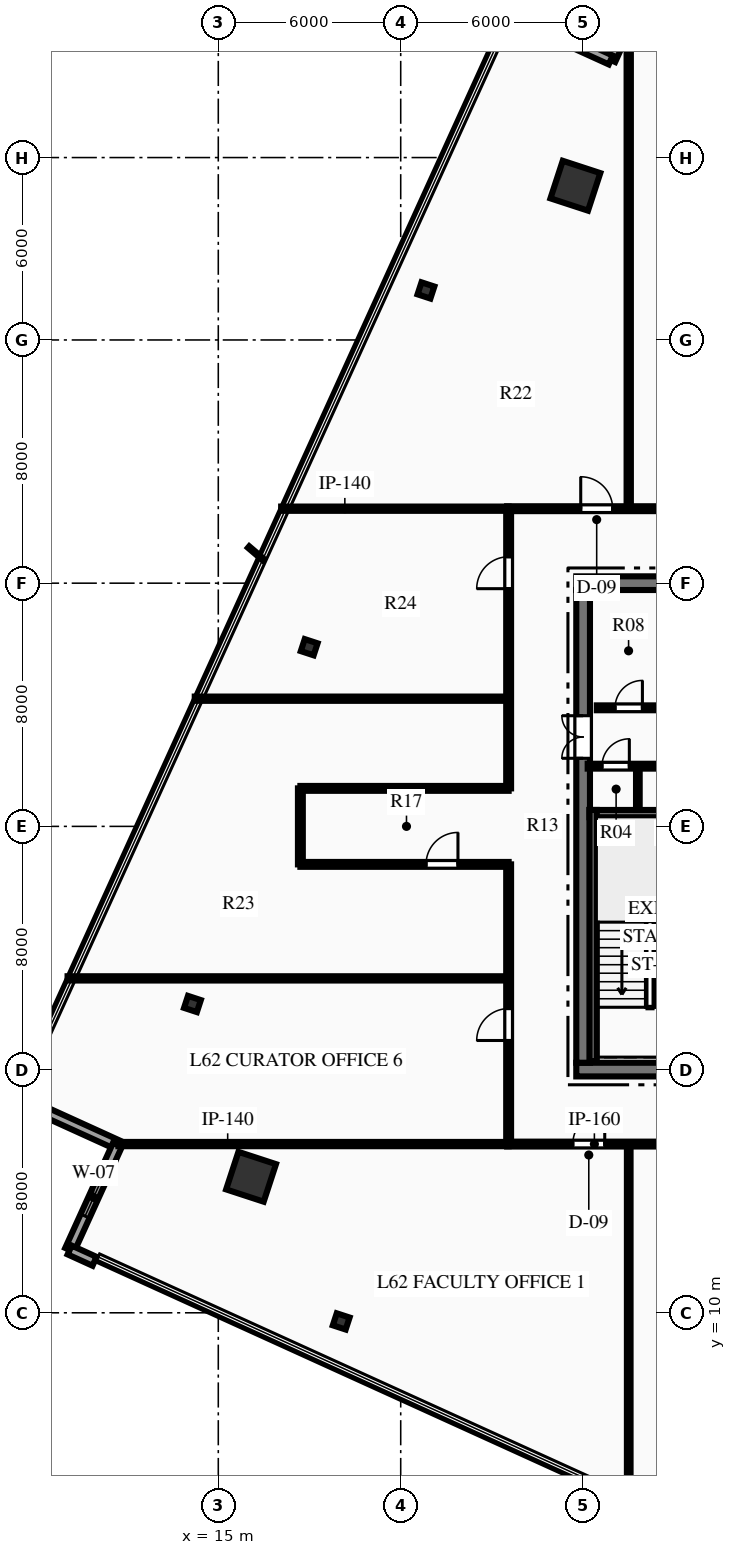
"""IFC4 building model, lengths in metres.
Left out: names, types, materials, properties, quantities, classifications, styles, units other than length and angle.
Written with IfcOpenShell. Run it as: python <this file> out.ifc"""

import sys

from ifc_helpers import new_model, si_unit, direction, frame, frame_2d, origin, origin_2d, place, context, subcontext, project, spatial, rectangle, hollow_rectangle, i_section, extrude, element, fill, save


model = new_model("IFC4")
c1 = context("Model", 3, precision=1e-05, world=origin(), true_north=direction((0.0, 1.0)))
c2 = subcontext(c1, "Body", "Model", "MODEL_VIEW")
j1 = project(units=[si_unit("LENGTHUNIT", "METRE"), si_unit("PLANEANGLEUNIT", "RADIAN")], contexts=[c1])
p1 = place(None, origin())
s1 = spatial("IfcSite", under=j1, at=p1, CompositionType="ELEMENT")
p2 = place(p1, origin())
s2 = spatial("IfcBuilding", under=s1, at=p2, CompositionType="ELEMENT")
p3 = place(p2, frame((0.0, 0.0, 248.7)))
s3 = spatial("IfcBuildingStorey", under=s2, at=p3, CompositionType="ELEMENT", Elevation=248.7)
p4 = place(p3, frame((26.775, 18.0, 0.0), z_axis=(0.0, 0.0, 1.0), x_axis=(1.0, 0.0, 0.0)))
e1 = element("IfcWall", 1, at=p4, inside=s3, PredefinedType="SHEAR", context=c2, shape_type="SweptSolid", body=[
    extrude(rectangle(XDim=18.45, YDim=0.45, at=frame_2d((9.225, 0.0))), origin(), (0.0, 0.0, 1.0), 3.75),
])
p5 = place(p4, frame((7.325, 0.0, 0.0)))
e2 = element("IfcOpeningElement", 2, at=p5, cuts=e1, PredefinedType="OPENING", context=c2, shape_type="SweptSolid", body=[
    extrude(rectangle(XDim=1.1, YDim=2.15, at=frame_2d((0.55, 1.075))), frame((0.0, 0.235, 0.0), z_axis=(0.0, -1.0, 0.0), x_axis=(1.0, 0.0, 0.0)), (0.0, 0.0, 1.0), 0.47),
])
p6 = place(p4, frame((10.025, 0.0, 0.0)))
e3 = element("IfcOpeningElement", 3, at=p6, cuts=e1, PredefinedType="OPENING", context=c2, shape_type="SweptSolid", body=[
    extrude(rectangle(XDim=1.1, YDim=2.15, at=frame_2d((0.55, 1.075))), frame((0.0, 0.235, 0.0), z_axis=(0.0, -1.0, 0.0), x_axis=(1.0, 0.0, 0.0)), (0.0, 0.0, 1.0), 0.47),
])
p7 = place(p3, frame((26.775, 34.0, 0.0), z_axis=(0.0, 0.0, 1.0), x_axis=(1.0, 0.0, 0.0)))
e4 = element("IfcWall", 4, at=p7, inside=s3, PredefinedType="SHEAR", context=c2, shape_type="SweptSolid", body=[
    extrude(rectangle(XDim=18.45, YDim=0.45, at=frame_2d((9.225, 0.0))), origin(), (0.0, 0.0, 1.0), 3.75),
])
p8 = place(p3, frame((27.0, 18.225, 0.0), z_axis=(0.0, 0.0, 1.0), x_axis=(0.0, 1.0, 0.0)))
e5 = element("IfcWall", 5, at=p8, inside=s3, PredefinedType="SHEAR", context=c2, shape_type="SweptSolid", body=[
    extrude(rectangle(XDim=15.55, YDim=0.45, at=frame_2d((7.775, 0.0))), origin(), (0.0, 0.0, 1.0), 3.75),
])
p9 = place(p8, frame((10.015, 0.0, 0.0)))
e6 = element("IfcOpeningElement", 6, at=p9, cuts=e5, PredefinedType="OPENING", context=c2, shape_type="SweptSolid", body=[
    extrude(rectangle(XDim=1.4, YDim=2.2, at=frame_2d((0.7, 1.1))), frame((0.0, 0.235, 0.0), z_axis=(0.0, -1.0, 0.0), x_axis=(1.0, 0.0, 0.0)), (0.0, 0.0, 1.0), 0.47),
])
p10 = place(p3, frame((27.21, 26.42, 0.0), z_axis=(0.0, 0.0, 1.0), x_axis=(1.0, 0.0, 0.0)))
e7 = element("IfcWall", 7, at=p10, inside=s3, PredefinedType="SHEAR", context=c2, shape_type="SweptSolid", body=[
    extrude(rectangle(XDim=3.98, YDim=0.24, at=frame_2d((1.99, 0.0))), origin(), (0.0, 0.0, 1.0), 3.75),
])
p11 = place(p3, frame((27.33, 18.28, 0.0), z_axis=(0.0, 0.0, 1.0), x_axis=(0.0, 1.0, 0.0)))
e8 = element("IfcWall", 8, at=p11, inside=s3, PredefinedType="SHEAR", context=c2, shape_type="SweptSolid", body=[
    extrude(rectangle(XDim=8.26, YDim=0.24, at=frame_2d((4.13, 0.0))), origin(), (0.0, 0.0, 1.0), 3.75),
])
for number, where, z_axis, x_axis in (
    (9, (26.745, 47.073, 0.0), (0.0, 0.0, 1.0), (0.311, 0.95, 0.0)),
    (10, (16.077, 14.475, 0.0), (0.0, 0.0, 1.0), (0.311, 0.95, 0.0)),
):
    element("IfcColumn", number, at=place(p3, frame(where, z_axis=z_axis, x_axis=x_axis)), inside=s3, PredefinedType="COLUMN", context=c2, shape_type="SweptSolid", body=[
        extrude(hollow_rectangle(XDim=1.3, YDim=1.3, WallThickness=0.06, at=origin_2d()), origin(), (0.0, 0.0, 1.0), 3.75),
    ])
for number, where, z_axis, x_axis in (
    (11, (21.83, 43.629, 0.0), (0.0, 0.0, 1.0), (0.311, 0.95, 0.0)),
    (12, (17.99, 31.894, 0.0), (0.0, 0.0, 1.0), (0.311, 0.95, 0.0)),
    (13, (14.149, 20.158, 0.0), (0.0, 0.0, 1.0), (0.311, 0.95, 0.0)),
    (14, (19.043, 9.716, 0.0), (0.0, 0.0, 1.0), (0.311, 0.95, 0.0)),
):
    element("IfcColumn", number, at=place(p3, frame(where, z_axis=z_axis, x_axis=x_axis)), inside=s3, PredefinedType="COLUMN", context=c2, shape_type="SweptSolid", body=[
        extrude(i_section(OverallWidth=0.416, OverallDepth=0.445, WebThickness=0.039, FlangeThickness=0.063, at=origin_2d()), origin(), (0.0, 0.0, 1.0), 3.75),
    ])
p12 = place(p3, frame((27.909, 51.21, 0.0), z_axis=(0.0, 0.0, 1.0), x_axis=(0.413885232781, 0.910329069121, 0.0)))
e15 = element("IfcWall", 15, at=p12, inside=s3, PredefinedType="STANDARD", context=c2, shape_type="SweptSolid", body=[
    extrude(rectangle(XDim=3.8, YDim=0.32, at=frame_2d((1.9, 0.0))), origin(), (0.0, 0.0, 1.0), 3.48),
])
p13 = place(p3, frame((24.449, 52.782, 0.0), z_axis=(0.0, 0.0, 1.0), x_axis=(0.910329069121, -0.413885232781, 0.0)))
e16 = element("IfcWall", 16, at=p13, inside=s3, PredefinedType="STANDARD", context=c2, shape_type="SweptSolid", body=[
    extrude(rectangle(XDim=3.8, YDim=0.32, at=frame_2d((1.9, 0.0))), origin(), (0.0, 0.0, 1.0), 3.48),
])
p14 = place(p13, frame((1.225, 0.0, 0.85)))
e17 = element("IfcOpeningElement", 17, at=p14, cuts=e16, PredefinedType="OPENING", context=c2, shape_type="SweptSolid", body=[
    extrude(rectangle(XDim=1.35, YDim=1.95, at=frame_2d((0.675, 0.975))), frame((0.0, 0.17, 0.0), z_axis=(0.0, -1.0, 0.0), x_axis=(1.0, 0.0, 0.0)), (0.0, 0.0, 1.0), 0.34),
])
p15 = place(p3, frame((11.684, 15.525, 0.0), z_axis=(0.0, 0.0, 1.0), x_axis=(-0.910329069121, 0.413885232781, 0.0)))
e18 = element("IfcWall", 18, at=p15, inside=s3, PredefinedType="STANDARD", context=c2, shape_type="SweptSolid", body=[
    extrude(rectangle(XDim=3.8, YDim=0.32, at=frame_2d((1.9, 0.0))), origin(), (0.0, 0.0, 1.0), 3.48),
])
p16 = place(p3, frame((10.111, 12.066, 0.0), z_axis=(0.0, 0.0, 1.0), x_axis=(0.413885232781, 0.910329069121, 0.0)))
e19 = element("IfcWall", 19, at=p16, inside=s3, PredefinedType="STANDARD", context=c2, shape_type="SweptSolid", body=[
    extrude(rectangle(XDim=3.8, YDim=0.32, at=frame_2d((1.9, 0.0))), origin(), (0.0, 0.0, 1.0), 3.48),
])
p17 = place(p16, frame((1.225, 0.0, 0.85)))
e20 = element("IfcOpeningElement", 20, at=p17, cuts=e19, PredefinedType="OPENING", context=c2, shape_type="SweptSolid", body=[
    extrude(rectangle(XDim=1.35, YDim=1.95, at=frame_2d((0.675, 0.975))), frame((0.0, 0.17, 0.0), z_axis=(0.0, -1.0, 0.0), x_axis=(1.0, 0.0, 0.0)), (0.0, 0.0, 1.0), 0.34),
])
p18 = place(p3, frame((10.93, 11.693, 0.0), z_axis=(0.0, 0.0, 1.0), x_axis=(-0.910310733165, 0.413925559836, 0.0)))
e21 = element("IfcWall", 21, at=p18, inside=s3, PredefinedType="STANDARD", context=c2, shape_type="SweptSolid", body=[
    extrude(rectangle(XDim=0.9, YDim=0.32, at=frame_2d((0.45, 0.0))), origin(), (0.0, 0.0, 1.0), 3.48),
])
p19 = place(p3, frame((27.15, 27.98, 0.0), z_axis=(0.0, 0.0, 1.0), x_axis=(1.0, 0.0, 0.0)))
e22 = element("IfcWall", 22, at=p19, inside=s3, PredefinedType="PARTITIONING", context=c2, shape_type="SweptSolid", body=[
    extrude(rectangle(XDim=4.05, YDim=0.16, at=frame_2d((2.025, 0.0))), origin(), (0.0, 0.0, 1.0), 3.48),
])
p20 = place(p19, frame((0.47, 0.0, 0.0)))
e23 = element("IfcOpeningElement", 23, at=p20, cuts=e22, PredefinedType="OPENING", context=c2, shape_type="SweptSolid", body=[
    extrude(rectangle(XDim=0.9, YDim=2.15, at=frame_2d((0.45, 1.075))), frame((0.0, 0.09, 0.0), z_axis=(0.0, -1.0, 0.0), x_axis=(1.0, 0.0, 0.0)), (0.0, 0.0, 1.0), 0.18),
])
p21 = place(p19, frame((2.36, 0.0, 0.0)))
e24 = element("IfcOpeningElement", 24, at=p21, cuts=e22, PredefinedType="OPENING", context=c2, shape_type="SweptSolid", body=[
    extrude(rectangle(XDim=0.9, YDim=2.15, at=frame_2d((0.45, 1.075))), frame((0.0, 0.09, 0.0), z_axis=(0.0, -1.0, 0.0), x_axis=(1.0, 0.0, 0.0)), (0.0, 0.0, 1.0), 0.18),
])
p22 = place(p3, frame((28.8, 26.54, 0.0), z_axis=(0.0, 0.0, 1.0), x_axis=(0.0, 1.0, 0.0)))
e25 = element("IfcWall", 25, at=p22, inside=s3, PredefinedType="PARTITIONING", context=c2, shape_type="SweptSolid", body=[
    extrude(rectangle(XDim=1.44, YDim=0.12, at=frame_2d((0.72, 0.0))), origin(), (0.0, 0.0, 1.0), 3.48),
])
p23 = place(p3, frame((27.45, 29.9, 0.0), z_axis=(0.0, 0.0, 1.0), x_axis=(1.0, 0.0, 0.0)))
e26 = element("IfcWall", 26, at=p23, inside=s3, PredefinedType="PARTITIONING", context=c2, shape_type="SweptSolid", body=[
    extrude(rectangle(XDim=4.43, YDim=0.16, at=frame_2d((2.215, 0.0))), origin(), (0.0, 0.0, 1.0), 3.48),
])
p24 = place(p23, frame((0.6, 0.0, 0.0)))
e27 = element("IfcOpeningElement", 27, at=p24, cuts=e26, PredefinedType="OPENING", context=c2, shape_type="SweptSolid", body=[
    extrude(rectangle(XDim=0.9, YDim=2.15, at=frame_2d((0.45, 1.075))), frame((0.0, 0.09, 0.0), z_axis=(0.0, -1.0, 0.0), x_axis=(1.0, 0.0, 0.0)), (0.0, 0.0, 1.0), 0.18),
])
p25 = place(p23, frame((2.85, 0.0, 0.0)))
e28 = element("IfcOpeningElement", 28, at=p25, cuts=e26, PredefinedType="OPENING", context=c2, shape_type="SweptSolid", body=[
    extrude(rectangle(XDim=0.9, YDim=2.15, at=frame_2d((0.45, 1.075))), frame((0.0, 0.09, 0.0), z_axis=(0.0, -1.0, 0.0), x_axis=(1.0, 0.0, 0.0)), (0.0, 0.0, 1.0), 0.18),
])
p26 = place(p3, frame((24.5, 15.55, 0.0), z_axis=(0.0, 0.0, 1.0), x_axis=(1.0, 0.0, 0.0)))
e29 = element("IfcWall", 29, at=p26, inside=s3, PredefinedType="PARTITIONING", context=c2, shape_type="SweptSolid", body=[
    extrude(rectangle(XDim=10.25, YDim=0.16, at=frame_2d((5.125, 0.0))), origin(), (0.0, 0.0, 1.0), 3.48),
])
p27 = place(p26, frame((2.161, 0.0, 0.0)))
e30 = element("IfcOpeningElement", 30, at=p27, cuts=e29, PredefinedType="OPENING", context=c2, shape_type="SweptSolid", body=[
    extrude(rectangle(XDim=1.05, YDim=2.15, at=frame_2d((0.525, 1.075))), frame((0.0, 0.09, 0.0), z_axis=(0.0, -1.0, 0.0), x_axis=(1.0, 0.0, 0.0)), (0.0, 0.0, 1.0), 0.18),
])
p28 = place(p26, frame((7.619, 0.0, 0.0)))
e31 = element("IfcOpeningElement", 31, at=p28, cuts=e29, PredefinedType="OPENING", context=c2, shape_type="SweptSolid", body=[
    extrude(rectangle(XDim=1.05, YDim=2.15, at=frame_2d((0.525, 1.075))), frame((0.0, 0.09, 0.0), z_axis=(0.0, -1.0, 0.0), x_axis=(1.0, 0.0, 0.0)), (0.0, 0.0, 1.0), 0.18),
])
p29 = place(p3, frame((24.5, 36.45, 0.0), z_axis=(0.0, 0.0, 1.0), x_axis=(1.0, 0.0, 0.0)))
e32 = element("IfcWall", 32, at=p29, inside=s3, PredefinedType="PARTITIONING", context=c2, shape_type="SweptSolid", body=[
    extrude(rectangle(XDim=10.25, YDim=0.16, at=frame_2d((5.125, 0.0))), origin(), (0.0, 0.0, 1.0), 3.48),
])
p30 = place(p29, frame((2.421, 0.0, 0.0)))
e33 = element("IfcOpeningElement", 33, at=p30, cuts=e32, PredefinedType="OPENING", context=c2, shape_type="SweptSolid", body=[
    extrude(rectangle(XDim=1.05, YDim=2.15, at=frame_2d((0.525, 1.075))), frame((0.0, 0.09, 0.0), z_axis=(0.0, -1.0, 0.0), x_axis=(1.0, 0.0, 0.0)), (0.0, 0.0, 1.0), 0.18),
])
p31 = place(p29, frame((7.619, 0.0, 0.0)))
e34 = element("IfcOpeningElement", 34, at=p31, cuts=e32, PredefinedType="OPENING", context=c2, shape_type="SweptSolid", body=[
    extrude(rectangle(XDim=1.05, YDim=2.15, at=frame_2d((0.525, 1.075))), frame((0.0, 0.09, 0.0), z_axis=(0.0, -1.0, 0.0), x_axis=(1.0, 0.0, 0.0)), (0.0, 0.0, 1.0), 0.18),
])
p32 = place(p3, frame((24.55, 15.55, 0.0), z_axis=(0.0, 0.0, 1.0), x_axis=(0.0, 1.0, 0.0)))
e35 = element("IfcWall", 35, at=p32, inside=s3, PredefinedType="PARTITIONING", context=c2, shape_type="SweptSolid", body=[
    extrude(rectangle(XDim=9.2, YDim=0.16, at=frame_2d((4.6, 0.0))), origin(), (0.0, 0.0, 1.0), 3.48),
])
p33 = place(p32, frame((3.407, 0.0, 0.0)))
e36 = element("IfcOpeningElement", 36, at=p33, cuts=e35, PredefinedType="OPENING", context=c2, shape_type="SweptSolid", body=[
    extrude(rectangle(XDim=1.05, YDim=2.15, at=frame_2d((0.525, 1.075))), frame((0.0, 0.09, 0.0), z_axis=(0.0, -1.0, 0.0), x_axis=(1.0, 0.0, 0.0)), (0.0, 0.0, 1.0), 0.18),
])
p34 = place(p3, frame((24.55, 27.25, 0.0), z_axis=(0.0, 0.0, 1.0), x_axis=(0.0, 1.0, 0.0)))
e37 = element("IfcWall", 37, at=p34, inside=s3, PredefinedType="PARTITIONING", context=c2, shape_type="SweptSolid", body=[
    extrude(rectangle(XDim=9.2, YDim=0.16, at=frame_2d((4.6, 0.0))), origin(), (0.0, 0.0, 1.0), 3.48),
])
p35 = place(p34, frame((6.569, 0.0, 0.0)))
e38 = element("IfcOpeningElement", 38, at=p35, cuts=e37, PredefinedType="OPENING", context=c2, shape_type="SweptSolid", body=[
    extrude(rectangle(XDim=1.05, YDim=2.15, at=frame_2d((0.525, 1.075))), frame((0.0, 0.09, 0.0), z_axis=(0.0, -1.0, 0.0), x_axis=(1.0, 0.0, 0.0)), (0.0, 0.0, 1.0), 0.18),
])
p36 = place(p3, frame((17.7, 24.75, 0.0), z_axis=(0.0, 0.0, 1.0), x_axis=(1.0, 0.0, 0.0)))
e39 = element("IfcWall", 39, at=p36, inside=s3, PredefinedType="PARTITIONING", context=c2, shape_type="SweptSolid", body=[
    extrude(rectangle(XDim=6.85, YDim=0.16, at=frame_2d((3.425, 0.0))), origin(), (0.0, 0.0, 1.0), 3.48),
])
p37 = place(p36, frame((4.133, 0.0, 0.0)))
e40 = element("IfcOpeningElement", 40, at=p37, cuts=e39, PredefinedType="OPENING", context=c2, shape_type="SweptSolid", body=[
    extrude(rectangle(XDim=1.05, YDim=2.15, at=frame_2d((0.525, 1.075))), frame((0.0, 0.09, 0.0), z_axis=(0.0, -1.0, 0.0), x_axis=(1.0, 0.0, 0.0)), (0.0, 0.0, 1.0), 0.18),
])
p38 = place(p3, frame((17.7, 27.25, 0.0), z_axis=(0.0, 0.0, 1.0), x_axis=(1.0, 0.0, 0.0)))
e41 = element("IfcWall", 41, at=p38, inside=s3, PredefinedType="PARTITIONING", context=c2, shape_type="SweptSolid", body=[
    extrude(rectangle(XDim=6.85, YDim=0.16, at=frame_2d((3.425, 0.0))), origin(), (0.0, 0.0, 1.0), 3.48),
])
p39 = place(p3, frame((17.7, 24.75, 0.0), z_axis=(0.0, 0.0, 1.0), x_axis=(0.0, 1.0, 0.0)))
e42 = element("IfcWall", 42, at=p39, inside=s3, PredefinedType="PARTITIONING", context=c2, shape_type="SweptSolid", body=[
    extrude(rectangle(XDim=2.5, YDim=0.16, at=frame_2d((1.25, 0.0))), origin(), (0.0, 0.0, 1.0), 3.48),
])
p40 = place(p3, frame((11.715, 15.55, 0.0), z_axis=(0.0, 0.0, 1.0), x_axis=(1.0, 0.0, 0.0)))
e43 = element("IfcWall", 43, at=p40, inside=s3, PredefinedType="PARTITIONING", context=c2, shape_type="SweptSolid", body=[
    extrude(rectangle(XDim=12.835, YDim=0.14, at=frame_2d((6.417, 0.0))), origin(), (0.0, 0.0, 1.0), 2.858),
])
p41 = place(p3, frame((17.067, 36.45, 0.0), z_axis=(0.0, 0.0, 1.0), x_axis=(1.0, 0.0, 0.0)))
e44 = element("IfcWall", 44, at=p41, inside=s3, PredefinedType="PARTITIONING", context=c2, shape_type="SweptSolid", body=[
    extrude(rectangle(XDim=7.483, YDim=0.14, at=frame_2d((3.741, 0.0))), origin(), (0.0, 0.0, 1.0), 3.48),
])
p42 = place(p3, frame((28.5, 3.749, 0.0), z_axis=(0.0, 0.0, 1.0), x_axis=(0.0, 1.0, 0.0)))
e45 = element("IfcWall", 45, at=p42, inside=s3, PredefinedType="PARTITIONING", context=c2, shape_type="SweptSolid", body=[
    extrude(rectangle(XDim=11.801, YDim=0.12, at=frame_2d((5.901, 0.0))), origin(), (0.0, 0.0, 1.0), 3.48),
])
p43 = place(p3, frame((28.5, 36.45, 0.0), z_axis=(0.0, 0.0, 1.0), x_axis=(0.0, 1.0, 0.0)))
e46 = element("IfcWall", 46, at=p43, inside=s3, PredefinedType="PARTITIONING", context=c2, shape_type="SweptSolid", body=[
    extrude(rectangle(XDim=15.964, YDim=0.14, at=frame_2d((7.982, 0.0))), origin(), (0.0, 0.0, 1.0), 3.48),
])
p44 = place(p3, frame((10.043, 21.0, 0.0), z_axis=(0.0, 0.0, 1.0), x_axis=(1.0, 0.0, 0.0)))
e47 = element("IfcWall", 47, at=p44, inside=s3, PredefinedType="PARTITIONING", context=c2, shape_type="SweptSolid", body=[
    extrude(rectangle(XDim=14.507, YDim=0.14, at=frame_2d((7.254, 0.0))), origin(), (0.0, 0.0, 1.0), 3.48),
])
p45 = place(p3, frame((14.226, 30.2, 0.0), z_axis=(0.0, 0.0, 1.0), x_axis=(1.0, 0.0, 0.0)))
e48 = element("IfcWall", 48, at=p45, inside=s3, PredefinedType="PARTITIONING", context=c2, shape_type="SweptSolid", body=[
    extrude(rectangle(XDim=10.324, YDim=0.14, at=frame_2d((5.162, 0.0))), origin(), (0.0, 0.0, 1.0), 3.48),
])
p46 = place(p17, origin())
e49 = element("IfcWindow", 49, at=p46, inside=s3, PartitioningType="SINGLE_PANEL", PredefinedType="WINDOW", context=c2, shape_type="SweptSolid", body=[
    extrude(rectangle(XDim=1.35, YDim=1.95, at=frame_2d((0.675, 0.975))), frame((0.0, 0.03, 0.0), z_axis=(0.0, -1.0, 0.0), x_axis=(1.0, 0.0, 0.0)), (0.0, 0.0, 1.0), 0.06),
])
fill(e20, e49)
p47 = place(p20, origin())
e50 = element("IfcDoor", 50, at=p47, inside=s3, OperationType="SINGLE_SWING_RIGHT", PredefinedType="DOOR", context=c2, shape_type="SweptSolid", body=[
    extrude(rectangle(XDim=0.9, YDim=2.15, at=frame_2d((0.45, 1.075))), frame((0.0, 0.025, 0.0), z_axis=(0.0, -1.0, 0.0), x_axis=(1.0, 0.0, 0.0)), (0.0, 0.0, 1.0), 0.05),
])
fill(e23, e50)
p48 = place(p24, origin())
e51 = element("IfcDoor", 51, at=p48, inside=s3, OperationType="SINGLE_SWING_RIGHT", PredefinedType="DOOR", context=c2, shape_type="SweptSolid", body=[
    extrude(rectangle(XDim=0.9, YDim=2.15, at=frame_2d((0.45, 1.075))), frame((0.0, 0.025, 0.0), z_axis=(0.0, -1.0, 0.0), x_axis=(1.0, 0.0, 0.0)), (0.0, 0.0, 1.0), 0.05),
])
fill(e27, e51)
p49 = place(p9, origin())
e52 = element("IfcDoor", 52, at=p49, inside=s3, OperationType="DOUBLE_DOOR_SINGLE_SWING", PredefinedType="DOOR", context=c2, shape_type="SweptSolid", body=[
    extrude(rectangle(XDim=1.4, YDim=2.2, at=frame_2d((0.7, 1.1))), frame((0.0, 0.025, 0.0), z_axis=(0.0, -1.0, 0.0), x_axis=(1.0, 0.0, 0.0)), (0.0, 0.0, 1.0), 0.05),
])
fill(e6, e52)
p50 = place(p27, origin())
e53 = element("IfcDoor", 53, at=p50, inside=s3, OperationType="SINGLE_SWING_RIGHT", PredefinedType="DOOR", context=c2, shape_type="SweptSolid", body=[
    extrude(rectangle(XDim=1.05, YDim=2.15, at=frame_2d((0.525, 1.075))), frame((0.0, 0.025, 0.0), z_axis=(0.0, -1.0, 0.0), x_axis=(1.0, 0.0, 0.0)), (0.0, 0.0, 1.0), 0.05),
])
fill(e30, e53)
p51 = place(p30, origin())
e54 = element("IfcDoor", 54, at=p51, inside=s3, OperationType="SINGLE_SWING_LEFT", PredefinedType="DOOR", context=c2, shape_type="SweptSolid", body=[
    extrude(rectangle(XDim=1.05, YDim=2.15, at=frame_2d((0.525, 1.075))), frame((0.0, 0.025, 0.0), z_axis=(0.0, -1.0, 0.0), x_axis=(1.0, 0.0, 0.0)), (0.0, 0.0, 1.0), 0.05),
])
fill(e33, e54)
p52 = place(p33, origin())
e55 = element("IfcDoor", 55, at=p52, inside=s3, OperationType="SINGLE_SWING_LEFT", PredefinedType="DOOR", context=c2, shape_type="SweptSolid", body=[
    extrude(rectangle(XDim=1.05, YDim=2.15, at=frame_2d((0.525, 1.075))), frame((0.0, 0.025, 0.0), z_axis=(0.0, -1.0, 0.0), x_axis=(1.0, 0.0, 0.0)), (0.0, 0.0, 1.0), 0.05),
])
fill(e36, e55)
p53 = place(p37, origin())
e56 = element("IfcDoor", 56, at=p53, inside=s3, OperationType="SINGLE_SWING_RIGHT", PredefinedType="DOOR", context=c2, shape_type="SweptSolid", body=[
    extrude(rectangle(XDim=1.05, YDim=2.15, at=frame_2d((0.525, 1.075))), frame((0.0, 0.025, 0.0), z_axis=(0.0, -1.0, 0.0), x_axis=(1.0, 0.0, 0.0)), (0.0, 0.0, 1.0), 0.05),
])
fill(e40, e56)
p54 = place(p35, origin())
e57 = element("IfcDoor", 57, at=p54, inside=s3, OperationType="SINGLE_SWING_LEFT", PredefinedType="DOOR", context=c2, shape_type="SweptSolid", body=[
    extrude(rectangle(XDim=1.05, YDim=2.15, at=frame_2d((0.525, 1.075))), frame((0.0, 0.025, 0.0), z_axis=(0.0, -1.0, 0.0), x_axis=(1.0, 0.0, 0.0)), (0.0, 0.0, 1.0), 0.05),
])
fill(e38, e57)
save(model, sys.argv[1])
